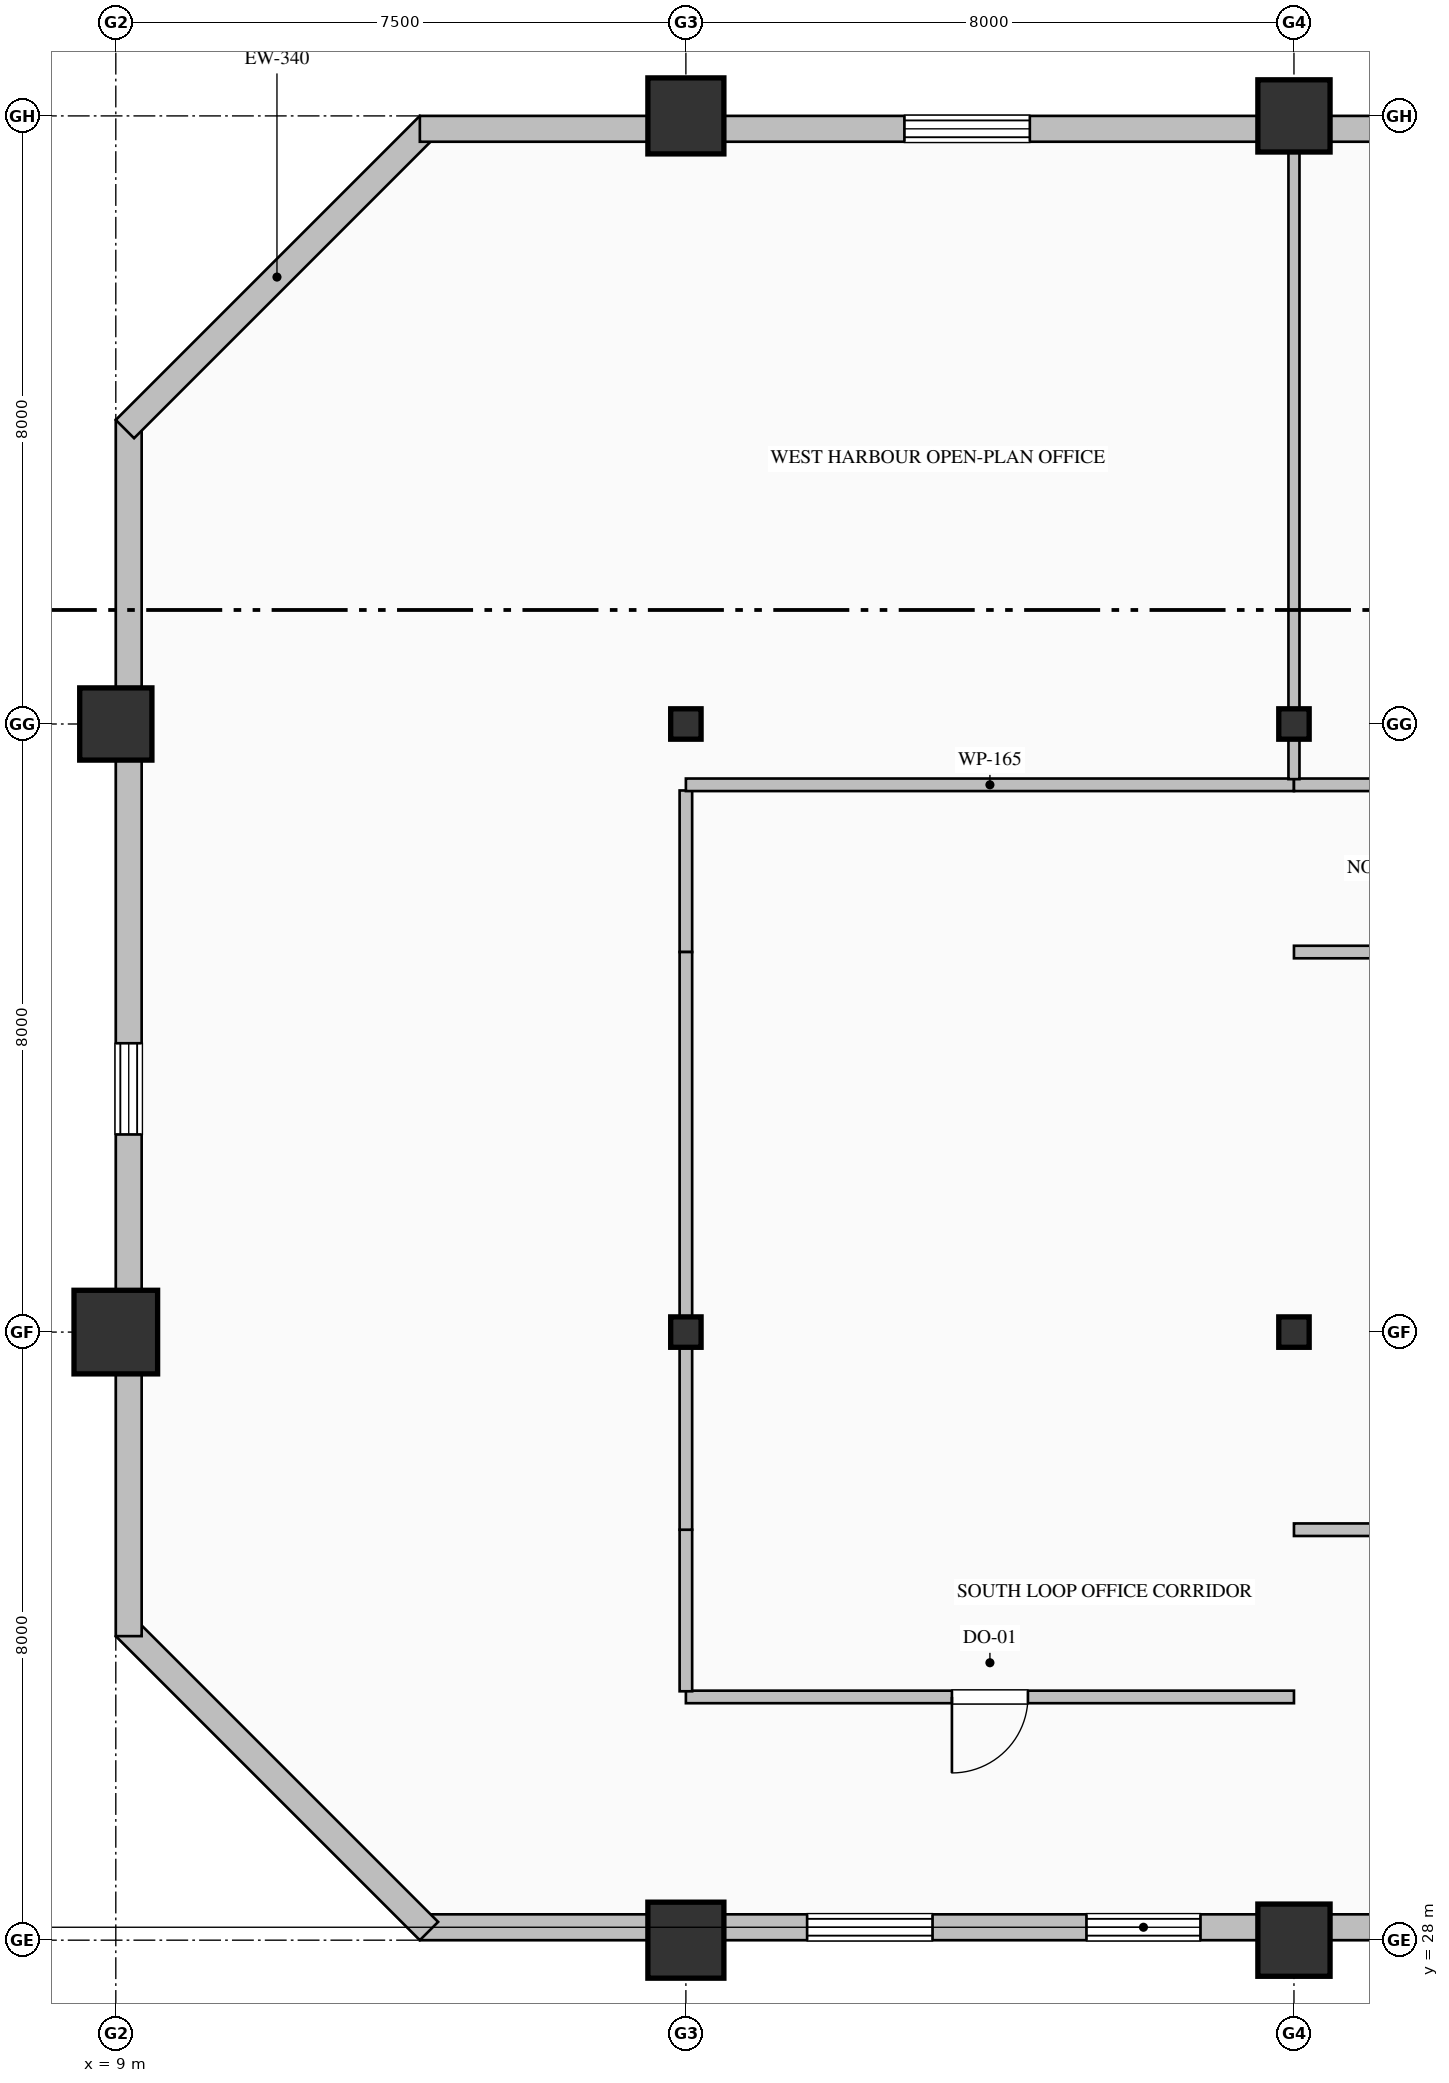
"""IFC4 building model, lengths in metres.
Left out: names, types, materials, properties, quantities, classifications, styles, units other than length and angle.
Written with IfcOpenShell. Run it as: python <this file> out.ifc"""

import sys

from ifc_helpers import new_model, si_unit, direction, frame, frame_2d, origin, origin_2d, place, context, subcontext, project, spatial, rectangle, hollow_rectangle, hollow_circle, i_section, extrude, element, fill, save


model = new_model("IFC4")
c1 = context("Model", 3, precision=1e-05, world=origin(), true_north=direction((0.0, 1.0)))
c2 = subcontext(c1, "Body", "Model", "MODEL_VIEW")
j1 = project(units=[si_unit("LENGTHUNIT", "METRE"), si_unit("PLANEANGLEUNIT", "RADIAN")], contexts=[c1])
p1 = place(None, origin())
s1 = spatial("IfcSite", under=j1, at=p1, CompositionType="ELEMENT")
p2 = place(p1, origin())
s2 = spatial("IfcBuilding", under=s1, at=p2, CompositionType="ELEMENT")
p3 = place(p2, frame((0.0, 0.0, 143.0)))
s3 = spatial("IfcBuildingStorey", under=s2, at=p3, CompositionType="ELEMENT", Elevation=143.0)
p4 = place(p3, frame((9.0, 36.0, 0.0), z_axis=(0.0, 0.0, 1.0), x_axis=(1.0, 0.0, 0.0)))
e1 = element("IfcColumn", 1, at=p4, inside=s3, PredefinedType="COLUMN", context=c2, shape_type="SweptSolid", body=[
    extrude(hollow_rectangle(XDim=1.1, YDim=1.1, WallThickness=0.04, at=origin_2d()), origin(), (0.0, 0.0, 1.0), 4.0),
])
p5 = place(p3, frame((9.0, 44.0, 0.0), z_axis=(0.0, 0.0, 1.0), x_axis=(1.0, 0.0, 0.0)))
e2 = element("IfcColumn", 2, at=p5, inside=s3, PredefinedType="COLUMN", context=c2, shape_type="SweptSolid", body=[
    extrude(hollow_rectangle(XDim=0.95, YDim=0.95, WallThickness=0.036, at=origin_2d()), origin(), (0.0, 0.0, 1.0), 4.0),
])
p6 = place(p3, frame((16.5, 28.0, 0.0), z_axis=(0.0, 0.0, 1.0), x_axis=(1.0, 0.0, 0.0)))
e3 = element("IfcColumn", 3, at=p6, inside=s3, PredefinedType="COLUMN", context=c2, shape_type="SweptSolid", body=[
    extrude(hollow_circle(Radius=0.5, WallThickness=0.036, at=origin_2d()), origin(), (0.0, 0.0, 1.0), 4.0),
])
for number, where, z_axis, x_axis in (
    (4, (16.5, 36.0, 0.0), (0.0, 0.0, 1.0), (1.0, 0.0, 0.0)),
    (5, (16.5, 44.0, 0.0), (0.0, 0.0, 1.0), (1.0, 0.0, 0.0)),
):
    element("IfcColumn", number, at=place(p3, frame(where, z_axis=z_axis, x_axis=x_axis)), inside=s3, PredefinedType="COLUMN", context=c2, shape_type="SweptSolid", body=[
        extrude(i_section(OverallWidth=0.4, OverallDepth=0.4, WebThickness=0.013, FlangeThickness=0.021, FilletRadius=0.022, at=origin_2d()), origin(), (0.0, 0.0, 1.0), 4.0),
    ])
p7 = place(p3, frame((16.5, 52.0, 0.0), z_axis=(0.0, 0.0, 1.0), x_axis=(1.0, 0.0, 0.0)))
e6 = element("IfcColumn", 6, at=p7, inside=s3, PredefinedType="COLUMN", context=c2, shape_type="SweptSolid", body=[
    extrude(hollow_circle(Radius=0.5, WallThickness=0.036, at=origin_2d()), origin(), (0.0, 0.0, 1.0), 4.0),
])
p8 = place(p3, frame((24.5, 28.0, 0.0), z_axis=(0.0, 0.0, 1.0), x_axis=(1.0, 0.0, 0.0)))
e7 = element("IfcColumn", 7, at=p8, inside=s3, PredefinedType="COLUMN", context=c2, shape_type="SweptSolid", body=[
    extrude(hollow_rectangle(XDim=0.95, YDim=0.95, WallThickness=0.036, at=origin_2d()), origin(), (0.0, 0.0, 1.0), 4.0),
])
for number, where, z_axis, x_axis in (
    (8, (24.5, 36.0, 0.0), (0.0, 0.0, 1.0), (1.0, 0.0, 0.0)),
    (9, (24.5, 44.0, 0.0), (0.0, 0.0, 1.0), (1.0, 0.0, 0.0)),
):
    element("IfcColumn", number, at=place(p3, frame(where, z_axis=z_axis, x_axis=x_axis)), inside=s3, PredefinedType="COLUMN", context=c2, shape_type="SweptSolid", body=[
        extrude(i_section(OverallWidth=0.4, OverallDepth=0.4, WebThickness=0.013, FlangeThickness=0.021, FilletRadius=0.022, at=origin_2d()), origin(), (0.0, 0.0, 1.0), 4.0),
    ])
p9 = place(p3, frame((24.5, 52.0, 0.0), z_axis=(0.0, 0.0, 1.0), x_axis=(1.0, 0.0, 0.0)))
e10 = element("IfcColumn", 10, at=p9, inside=s3, PredefinedType="COLUMN", context=c2, shape_type="SweptSolid", body=[
    extrude(hollow_rectangle(XDim=0.95, YDim=0.95, WallThickness=0.036, at=origin_2d()), origin(), (0.0, 0.0, 1.0), 4.0),
])
p10 = place(p3, frame((40.52, 28.17, 0.0), z_axis=(0.0, 0.0, 1.0), x_axis=(-1.0, 0.0, 0.0)))
e11 = element("IfcWall", 11, at=p10, inside=s3, PredefinedType="SOLIDWALL", context=c2, shape_type="SweptSolid", body=[
    extrude(rectangle(XDim=27.52, YDim=0.34, at=frame_2d((13.76, 0.0))), origin(), (0.0, 0.0, 1.0), 3.165),
])
p11 = place(p10, frame((3.0, 0.0, 0.7)))
e12 = element("IfcOpeningElement", 12, at=p11, cuts=e11, PredefinedType="OPENING", context=c2, shape_type="SweptSolid", body=[
    extrude(rectangle(XDim=1.2, YDim=1.85, at=frame_2d((0.6, 0.925))), frame((0.0, 0.18, 0.0), z_axis=(0.0, -1.0, 0.0), x_axis=(1.0, 0.0, 0.0)), (0.0, 0.0, 1.0), 0.36),
])
p12 = place(p10, frame((9.975, 0.0, 0.85)))
e13 = element("IfcOpeningElement", 13, at=p12, cuts=e11, PredefinedType="OPENING", context=c2, shape_type="SweptSolid", body=[
    extrude(rectangle(XDim=1.65, YDim=1.95, at=frame_2d((0.825, 0.975))), frame((0.0, 0.18, 0.0), z_axis=(0.0, -1.0, 0.0), x_axis=(1.0, 0.0, 0.0)), (0.0, 0.0, 1.0), 0.36),
])
p13 = place(p10, frame((13.8, 0.0, 0.7)))
e14 = element("IfcOpeningElement", 14, at=p13, cuts=e11, PredefinedType="OPENING", context=c2, shape_type="SweptSolid", body=[
    extrude(rectangle(XDim=1.2, YDim=1.85, at=frame_2d((0.6, 0.925))), frame((0.0, 0.18, 0.0), z_axis=(0.0, -1.0, 0.0), x_axis=(1.0, 0.0, 0.0)), (0.0, 0.0, 1.0), 0.36),
])
p14 = place(p10, frame((17.25, 0.0, 0.85)))
e15 = element("IfcOpeningElement", 15, at=p14, cuts=e11, PredefinedType="OPENING", context=c2, shape_type="SweptSolid", body=[
    extrude(rectangle(XDim=1.5, YDim=1.95, at=frame_2d((0.75, 0.975))), frame((0.0, 0.18, 0.0), z_axis=(0.0, -1.0, 0.0), x_axis=(1.0, 0.0, 0.0)), (0.0, 0.0, 1.0), 0.36),
])
p15 = place(p10, frame((20.775, 0.0, 0.85)))
e16 = element("IfcOpeningElement", 16, at=p15, cuts=e11, PredefinedType="OPENING", context=c2, shape_type="SweptSolid", body=[
    extrude(rectangle(XDim=1.65, YDim=1.95, at=frame_2d((0.825, 0.975))), frame((0.0, 0.18, 0.0), z_axis=(0.0, -1.0, 0.0), x_axis=(1.0, 0.0, 0.0)), (0.0, 0.0, 1.0), 0.36),
])
p16 = place(p3, frame((13.12, 28.12, 0.0), z_axis=(0.0, 0.0, 1.0), x_axis=(-0.707106781187, 0.707106781187, 0.0)))
e17 = element("IfcWall", 17, at=p16, inside=s3, PredefinedType="SOLIDWALL", context=c2, shape_type="SweptSolid", body=[
    extrude(rectangle(XDim=5.657, YDim=0.34, at=frame_2d((2.828, 0.0))), origin(), (0.0, 0.0, 1.0), 3.765),
])
p17 = place(p3, frame((9.17, 32.0, 0.0), z_axis=(0.0, 0.0, 1.0), x_axis=(0.0, 1.0, 0.0)))
e18 = element("IfcWall", 18, at=p17, inside=s3, PredefinedType="SOLIDWALL", context=c2, shape_type="SweptSolid", body=[
    extrude(rectangle(XDim=16.0, YDim=0.34, at=frame_2d((8.0, 0.0))), origin(), (0.0, 0.0, 1.0), 3.265),
])
p18 = place(p17, frame((6.6, 0.0, 0.7)))
e19 = element("IfcOpeningElement", 19, at=p18, cuts=e18, PredefinedType="OPENING", context=c2, shape_type="SweptSolid", body=[
    extrude(rectangle(XDim=1.2, YDim=1.85, at=frame_2d((0.6, 0.925))), frame((0.0, 0.18, 0.0), z_axis=(0.0, -1.0, 0.0), x_axis=(1.0, 0.0, 0.0)), (0.0, 0.0, 1.0), 0.36),
])
p19 = place(p3, frame((9.12, 47.88, 0.0), z_axis=(0.0, 0.0, 1.0), x_axis=(0.707106781187, 0.707106781187, 0.0)))
e20 = element("IfcWall", 20, at=p19, inside=s3, PredefinedType="SOLIDWALL", context=c2, shape_type="SweptSolid", body=[
    extrude(rectangle(XDim=5.657, YDim=0.34, at=frame_2d((2.828, 0.0))), origin(), (0.0, 0.0, 1.0), 3.765),
])
p20 = place(p3, frame((13.0, 51.83, 0.0), z_axis=(0.0, 0.0, 1.0), x_axis=(1.0, 0.0, 0.0)))
e21 = element("IfcWall", 21, at=p20, inside=s3, PredefinedType="SOLIDWALL", context=c2, shape_type="SweptSolid", body=[
    extrude(rectangle(XDim=27.52, YDim=0.34, at=frame_2d((13.76, 0.0))), origin(), (0.0, 0.0, 1.0), 3.265),
])
p21 = place(p20, frame((6.375, 0.0, 0.85)))
e22 = element("IfcOpeningElement", 22, at=p21, cuts=e21, PredefinedType="OPENING", context=c2, shape_type="SweptSolid", body=[
    extrude(rectangle(XDim=1.65, YDim=1.95, at=frame_2d((0.825, 0.975))), frame((0.0, 0.18, 0.0), z_axis=(0.0, -1.0, 0.0), x_axis=(1.0, 0.0, 0.0)), (0.0, 0.0, 1.0), 0.36),
])
p22 = place(p20, frame((13.65, 0.0, 0.85)))
e23 = element("IfcOpeningElement", 23, at=p22, cuts=e21, PredefinedType="OPENING", context=c2, shape_type="SweptSolid", body=[
    extrude(rectangle(XDim=1.5, YDim=1.95, at=frame_2d((0.75, 0.975))), frame((0.0, 0.18, 0.0), z_axis=(0.0, -1.0, 0.0), x_axis=(1.0, 0.0, 0.0)), (0.0, 0.0, 1.0), 0.36),
])
p23 = place(p3, frame((24.5, 31.2, 0.0), z_axis=(0.0, 0.0, 1.0), x_axis=(-1.0, 0.0, 0.0)))
e24 = element("IfcWall", 24, at=p23, inside=s3, PredefinedType="PARTITIONING", context=c2, shape_type="SweptSolid", body=[
    extrude(rectangle(XDim=8.0, YDim=0.165, at=frame_2d((4.0, 0.0))), origin(), (0.0, 0.0, 1.0), 3.765),
])
p24 = place(p23, frame((3.5, 0.0, 0.0)))
e25 = element("IfcOpeningElement", 25, at=p24, cuts=e24, PredefinedType="OPENING", context=c2, shape_type="SweptSolid", body=[
    extrude(rectangle(XDim=1.0, YDim=2.15, at=frame_2d((0.5, 1.075))), frame((0.0, 0.093, 0.0), z_axis=(0.0, -1.0, 0.0), x_axis=(1.0, 0.0, 0.0)), (0.0, 0.0, 1.0), 0.185),
])
p25 = place(p3, frame((16.5, 31.274, 0.0), z_axis=(0.0, 0.0, 1.0), x_axis=(0.0, 1.0, 0.0)))
e26 = element("IfcWall", 26, at=p25, inside=s3, PredefinedType="PARTITIONING", context=c2, shape_type="SweptSolid", body=[
    extrude(rectangle(XDim=2.125, YDim=0.165, at=frame_2d((1.063, 0.0))), origin(), (0.0, 0.0, 1.0), 3.157),
])
p26 = place(p3, frame((24.5, 33.4, 0.0), z_axis=(0.0, 0.0, 1.0), x_axis=(1.0, 0.0, 0.0)))
e27 = element("IfcWall", 27, at=p26, inside=s3, PredefinedType="PARTITIONING", context=c2, shape_type="SweptSolid", body=[
    extrude(rectangle(XDim=6.5, YDim=0.165, at=frame_2d((3.25, 0.0))), origin(), (0.0, 0.0, 1.0), 3.765),
])
p27 = place(p26, frame((2.75, 0.0, 0.0)))
e28 = element("IfcOpeningElement", 28, at=p27, cuts=e27, PredefinedType="OPENING", context=c2, shape_type="SweptSolid", body=[
    extrude(rectangle(XDim=1.0, YDim=2.15, at=frame_2d((0.5, 1.075))), frame((0.0, 0.093, 0.0), z_axis=(0.0, -1.0, 0.0), x_axis=(1.0, 0.0, 0.0)), (0.0, 0.0, 1.0), 0.185),
])
p28 = place(p3, frame((16.5, 41.0, 0.0), z_axis=(0.0, 0.0, 1.0), x_axis=(0.0, 1.0, 0.0)))
e29 = element("IfcWall", 29, at=p28, inside=s3, PredefinedType="PARTITIONING", context=c2, shape_type="SweptSolid", body=[
    extrude(rectangle(XDim=2.125, YDim=0.165, at=frame_2d((1.063, 0.0))), origin(), (0.0, 0.0, 1.0), 3.157),
])
p29 = place(p3, frame((16.5, 43.2, 0.0), z_axis=(0.0, 0.0, 1.0), x_axis=(1.0, 0.0, 0.0)))
e30 = element("IfcWall", 30, at=p29, inside=s3, PredefinedType="PARTITIONING", context=c2, shape_type="SweptSolid", body=[
    extrude(rectangle(XDim=8.0, YDim=0.165, at=frame_2d((4.0, 0.0))), origin(), (0.0, 0.0, 1.0), 3.765),
])
p30 = place(p3, frame((24.5, 43.2, 0.0), z_axis=(0.0, 0.0, 1.0), x_axis=(1.0, 0.0, 0.0)))
e31 = element("IfcWall", 31, at=p30, inside=s3, PredefinedType="PARTITIONING", context=c2, shape_type="SweptSolid", body=[
    extrude(rectangle(XDim=13.3, YDim=0.165, at=frame_2d((6.65, 0.0))), origin(), (0.0, 0.0, 1.0), 3.765),
])
p31 = place(p30, frame((6.2, 0.0, 0.0)))
e32 = element("IfcOpeningElement", 32, at=p31, cuts=e31, PredefinedType="OPENING", context=c2, shape_type="SweptSolid", body=[
    extrude(rectangle(XDim=0.9, YDim=2.15, at=frame_2d((0.45, 1.075))), frame((0.0, 0.093, 0.0), z_axis=(0.0, -1.0, 0.0), x_axis=(1.0, 0.0, 0.0)), (0.0, 0.0, 1.0), 0.185),
])
p32 = place(p3, frame((31.0, 41.0, 0.0), z_axis=(0.0, 0.0, 1.0), x_axis=(-1.0, 0.0, 0.0)))
e33 = element("IfcWall", 33, at=p32, inside=s3, PredefinedType="PARTITIONING", context=c2, shape_type="SweptSolid", body=[
    extrude(rectangle(XDim=6.5, YDim=0.165, at=frame_2d((3.25, 0.0))), origin(), (0.0, 0.0, 1.0), 3.765),
])
p33 = place(p3, frame((16.5, 33.4, 0.0), z_axis=(0.0, 0.0, 1.0), x_axis=(0.0, 1.0, 0.0)))
e34 = element("IfcWall", 34, at=p33, inside=s3, PredefinedType="PARTITIONING", context=c2, shape_type="SweptSolid", body=[
    extrude(rectangle(XDim=7.6, YDim=0.165, at=frame_2d((3.8, 0.0))), origin(), (0.0, 0.0, 1.0), 3.157),
])
p34 = place(p3, frame((24.5, 51.668, 0.0), z_axis=(0.0, 0.0, 1.0), x_axis=(0.0, -1.0, 0.0)))
e35 = element("IfcWall", 35, at=p34, inside=s3, PredefinedType="PARTITIONING", context=c2, shape_type="SweptSolid", body=[
    extrude(rectangle(XDim=8.394, YDim=0.145, at=frame_2d((4.197, 0.0))), origin(), (0.0, 0.0, 1.0), 3.157),
])
p35 = place(p14, origin())
e36 = element("IfcWindow", 36, at=p35, inside=s3, PartitioningType="DOUBLE_PANEL_VERTICAL", PredefinedType="WINDOW", context=c2, shape_type="SweptSolid", body=[
    extrude(rectangle(XDim=1.5, YDim=1.95, at=frame_2d((0.75, 0.975))), frame((0.0, 0.15, 0.0), z_axis=(0.0, -1.0, 0.0), x_axis=(1.0, 0.0, 0.0)), (0.0, 0.0, 1.0), 0.06),
])
fill(e15, e36)
p36 = place(p15, origin())
e37 = element("IfcWindow", 37, at=p36, inside=s3, PartitioningType="DOUBLE_PANEL_VERTICAL", PredefinedType="WINDOW", context=c2, shape_type="SweptSolid", body=[
    extrude(rectangle(XDim=1.65, YDim=1.95, at=frame_2d((0.825, 0.975))), frame((0.0, 0.15, 0.0), z_axis=(0.0, -1.0, 0.0), x_axis=(1.0, 0.0, 0.0)), (0.0, 0.0, 1.0), 0.06),
])
fill(e16, e37)
p37 = place(p18, origin())
e38 = element("IfcWindow", 38, at=p37, inside=s3, PartitioningType="DOUBLE_PANEL_VERTICAL", PredefinedType="WINDOW", context=c2, shape_type="SweptSolid", body=[
    extrude(rectangle(XDim=1.2, YDim=1.85, at=frame_2d((0.6, 0.925))), frame((0.0, 0.15, 0.0), z_axis=(0.0, -1.0, 0.0), x_axis=(1.0, 0.0, 0.0)), (0.0, 0.0, 1.0), 0.06),
])
fill(e19, e38)
p38 = place(p21, origin())
e39 = element("IfcWindow", 39, at=p38, inside=s3, PartitioningType="DOUBLE_PANEL_VERTICAL", PredefinedType="WINDOW", context=c2, shape_type="SweptSolid", body=[
    extrude(rectangle(XDim=1.65, YDim=1.95, at=frame_2d((0.825, 0.975))), frame((0.0, 0.15, 0.0), z_axis=(0.0, -1.0, 0.0), x_axis=(1.0, 0.0, 0.0)), (0.0, 0.0, 1.0), 0.06),
])
fill(e22, e39)
p39 = place(p24, origin())
e40 = element("IfcDoor", 40, at=p39, inside=s3, OperationType="SINGLE_SWING_RIGHT", PredefinedType="DOOR", context=c2, shape_type="SweptSolid", body=[
    extrude(rectangle(XDim=1.0, YDim=2.15, at=frame_2d((0.5, 1.075))), frame((0.0, 0.025, 0.0), z_axis=(0.0, -1.0, 0.0), x_axis=(1.0, 0.0, 0.0)), (0.0, 0.0, 1.0), 0.05),
])
fill(e25, e40)
save(model, sys.argv[1])
